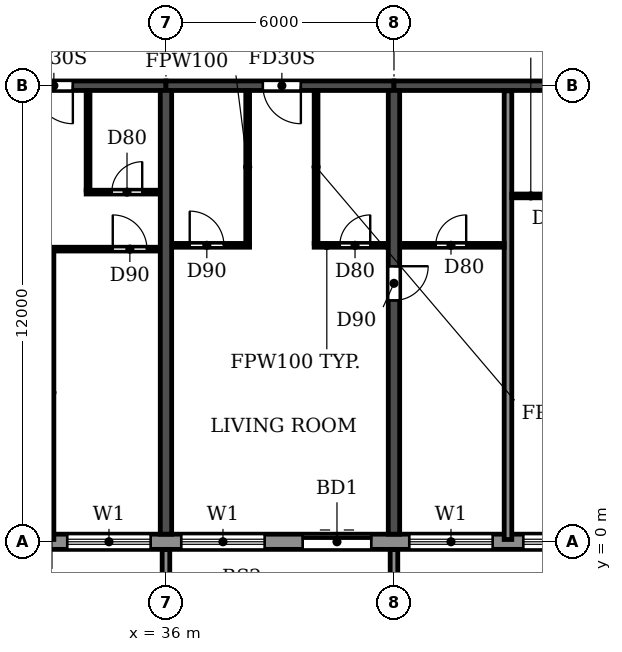
"""IFC4 building model, lengths in metres.
Left out: names, types, materials, properties, quantities, classifications, styles, units other than length and angle.
Written with IfcOpenShell. Run it as: python <this file> out.ifc"""

import sys

from ifc_helpers import new_model, si_unit, direction, frame, frame_2d, origin, place, context, subcontext, project, spatial, polyline, rectangle, outline, extrude, source, transform, mapped, element, fill, save


model = new_model("IFC4")
c1 = context("Model", 3, precision=1e-05, world=origin(), true_north=direction((0.0, 1.0)))
c2 = subcontext(c1, "Body", "Model", "MODEL_VIEW")
j1 = project(units=[si_unit("LENGTHUNIT", "METRE"), si_unit("PLANEANGLEUNIT", "RADIAN")], contexts=[c1])
p1 = place(None, origin())
s1 = spatial("IfcSite", under=j1, at=p1, CompositionType="ELEMENT")
p2 = place(p1, origin())
s2 = spatial("IfcBuilding", under=s1, at=p2, CompositionType="ELEMENT")
p3 = place(p2, frame((0.0, 0.0, 122.4)))
s3 = spatial("IfcBuildingStorey", under=s2, at=p3, CompositionType="ELEMENT", Elevation=122.4)
p4 = place(p3, frame((36.0, 0.2, 0.0), z_axis=(0.0, 0.0, 1.0), x_axis=(0.0, 1.0, 0.0)))
e1 = element("IfcWall", 1, at=p4, inside=s3, PredefinedType="SHEAR", context=c2, shape_type="SweptSolid", body=[
    extrude(rectangle(XDim=11.675, YDim=0.3, at=frame_2d((5.837, 0.0))), origin(), (0.0, 0.0, 1.0), 3.07),
])
p5 = place(p3, frame((42.0, 0.2, 0.0), z_axis=(0.0, 0.0, 1.0), x_axis=(0.0, 1.0, 0.0)))
e2 = element("IfcWall", 2, at=p5, inside=s3, PredefinedType="SHEAR", context=c2, shape_type="SweptSolid", body=[
    extrude(rectangle(XDim=11.675, YDim=0.3, at=frame_2d((5.837, 0.0))), origin(), (0.0, 0.0, 1.0), 3.07),
])
p6 = place(p5, frame((6.15, 0.0, 0.0)))
e3 = element("IfcOpeningElement", 3, at=p6, cuts=e2, PredefinedType="OPENING", context=c2, shape_type="SweptSolid", body=[
    extrude(rectangle(XDim=0.9, YDim=2.1, at=frame_2d((0.45, 1.05))), frame((0.0, 0.16, 0.0), z_axis=(0.0, -1.0, 0.0), x_axis=(1.0, 0.0, 0.0)), (0.0, 0.0, 1.0), 0.32),
])
p7 = place(p3, frame((30.0, 12.0, 0.0), z_axis=(0.0, 0.0, 1.0), x_axis=(1.0, 0.0, 0.0)))
e4 = element("IfcWall", 4, at=p7, inside=s3, PredefinedType="SHEAR", context=c2, shape_type="SweptSolid", body=[
    extrude(rectangle(XDim=6.0, YDim=0.25, at=frame_2d((3.0, 0.0))), origin(), (0.0, 0.0, 1.0), 2.47),
])
p8 = place(p7, frame((2.55, 0.0, 0.0)))
e5 = element("IfcOpeningElement", 5, at=p8, cuts=e4, PredefinedType="OPENING", context=c2, shape_type="SweptSolid", body=[
    extrude(rectangle(XDim=1.0, YDim=2.1, at=frame_2d((0.5, 1.05))), frame((0.0, 0.135, 0.0), z_axis=(0.0, -1.0, 0.0), x_axis=(1.0, 0.0, 0.0)), (0.0, 0.0, 1.0), 0.27),
])
p9 = place(p3, frame((36.0, 12.0, 0.0), z_axis=(0.0, 0.0, 1.0), x_axis=(1.0, 0.0, 0.0)))
e6 = element("IfcWall", 6, at=p9, inside=s3, PredefinedType="SHEAR", context=c2, shape_type="SweptSolid", body=[
    extrude(rectangle(XDim=6.0, YDim=0.25, at=frame_2d((3.0, 0.0))), origin(), (0.0, 0.0, 1.0), 2.47),
])
p10 = place(p9, frame((2.55, 0.0, 0.0)))
e7 = element("IfcOpeningElement", 7, at=p10, cuts=e6, PredefinedType="OPENING", context=c2, shape_type="SweptSolid", body=[
    extrude(rectangle(XDim=1.0, YDim=2.1, at=frame_2d((0.5, 1.05))), frame((0.0, 0.135, 0.0), z_axis=(0.0, -1.0, 0.0), x_axis=(1.0, 0.0, 0.0)), (0.0, 0.0, 1.0), 0.27),
])
p11 = place(p3, frame((42.0, 12.0, 0.0), z_axis=(0.0, 0.0, 1.0), x_axis=(1.0, 0.0, 0.0)))
e8 = element("IfcWall", 8, at=p11, inside=s3, PredefinedType="SHEAR", context=c2, shape_type="SweptSolid", body=[
    extrude(rectangle(XDim=6.0, YDim=0.25, at=frame_2d((3.0, 0.0))), origin(), (0.0, 0.0, 1.0), 2.47),
])
p12 = place(p3, frame((16.683, 0.0, 0.0), z_axis=(0.0, 0.0, 1.0), x_axis=(1.0, 0.0, 0.0)))
e9 = element("IfcWall", 9, at=p12, inside=s3, PredefinedType="STANDARD", context=c2, shape_type="SweptSolid", body=[
    extrude(rectangle(XDim=68.634, YDim=0.4, at=frame_2d((34.317, 0.0))), origin(), (0.0, 0.0, 1.0), 3.07),
])
p13 = place(p12, frame((1.717, 0.0, 0.9)))
e10 = element("IfcOpeningElement", 10, at=p13, cuts=e9, PredefinedType="OPENING", context=c2, shape_type="SweptSolid", body=[
    extrude(rectangle(XDim=2.2, YDim=1.5, at=frame_2d((1.1, 0.75))), frame((0.0, 0.21, 0.0), z_axis=(0.0, -1.0, 0.0), x_axis=(1.0, 0.0, 0.0)), (0.0, 0.0, 1.0), 0.42),
])
p14 = place(p12, frame((4.717, 0.0, 0.9)))
e11 = element("IfcOpeningElement", 11, at=p14, cuts=e9, PredefinedType="OPENING", context=c2, shape_type="SweptSolid", body=[
    extrude(rectangle(XDim=2.2, YDim=1.5, at=frame_2d((1.1, 0.75))), frame((0.0, 0.21, 0.0), z_axis=(0.0, -1.0, 0.0), x_axis=(1.0, 0.0, 0.0)), (0.0, 0.0, 1.0), 0.42),
])
p15 = place(p12, frame((7.717, 0.0, 0.9)))
e12 = element("IfcOpeningElement", 12, at=p15, cuts=e9, PredefinedType="OPENING", context=c2, shape_type="SweptSolid", body=[
    extrude(rectangle(XDim=2.2, YDim=1.5, at=frame_2d((1.1, 0.75))), frame((0.0, 0.21, 0.0), z_axis=(0.0, -1.0, 0.0), x_axis=(1.0, 0.0, 0.0)), (0.0, 0.0, 1.0), 0.42),
])
p16 = place(p12, frame((10.717, 0.0, 0.9)))
e13 = element("IfcOpeningElement", 13, at=p16, cuts=e9, PredefinedType="OPENING", context=c2, shape_type="SweptSolid", body=[
    extrude(rectangle(XDim=2.2, YDim=1.5, at=frame_2d((1.1, 0.75))), frame((0.0, 0.21, 0.0), z_axis=(0.0, -1.0, 0.0), x_axis=(1.0, 0.0, 0.0)), (0.0, 0.0, 1.0), 0.42),
])
p17 = place(p12, frame((13.717, 0.0, 0.9)))
e14 = element("IfcOpeningElement", 14, at=p17, cuts=e9, PredefinedType="OPENING", context=c2, shape_type="SweptSolid", body=[
    extrude(rectangle(XDim=2.2, YDim=1.5, at=frame_2d((1.1, 0.75))), frame((0.0, 0.21, 0.0), z_axis=(0.0, -1.0, 0.0), x_axis=(1.0, 0.0, 0.0)), (0.0, 0.0, 1.0), 0.42),
])
p18 = place(p12, frame((16.717, 0.0, 0.9)))
e15 = element("IfcOpeningElement", 15, at=p18, cuts=e9, PredefinedType="OPENING", context=c2, shape_type="SweptSolid", body=[
    extrude(rectangle(XDim=2.2, YDim=1.5, at=frame_2d((1.1, 0.75))), frame((0.0, 0.21, 0.0), z_axis=(0.0, -1.0, 0.0), x_axis=(1.0, 0.0, 0.0)), (0.0, 0.0, 1.0), 0.42),
])
p19 = place(p12, frame((19.717, 0.0, 0.9)))
e16 = element("IfcOpeningElement", 16, at=p19, cuts=e9, PredefinedType="OPENING", context=c2, shape_type="SweptSolid", body=[
    extrude(rectangle(XDim=2.2, YDim=1.5, at=frame_2d((1.1, 0.75))), frame((0.0, 0.21, 0.0), z_axis=(0.0, -1.0, 0.0), x_axis=(1.0, 0.0, 0.0)), (0.0, 0.0, 1.0), 0.42),
])
p20 = place(p12, frame((22.917, 0.0, 0.0)))
e17 = element("IfcOpeningElement", 17, at=p20, cuts=e9, PredefinedType="OPENING", context=c2, shape_type="SweptSolid", body=[
    extrude(rectangle(XDim=1.8, YDim=2.4, at=frame_2d((0.9, 1.2))), frame((0.0, 0.21, 0.0), z_axis=(0.0, -1.0, 0.0), x_axis=(1.0, 0.0, 0.0)), (0.0, 0.0, 1.0), 0.42),
])
p21 = place(p12, frame((25.717, 0.0, 0.9)))
e18 = element("IfcOpeningElement", 18, at=p21, cuts=e9, PredefinedType="OPENING", context=c2, shape_type="SweptSolid", body=[
    extrude(rectangle(XDim=2.2, YDim=1.5, at=frame_2d((1.1, 0.75))), frame((0.0, 0.21, 0.0), z_axis=(0.0, -1.0, 0.0), x_axis=(1.0, 0.0, 0.0)), (0.0, 0.0, 1.0), 0.42),
])
p22 = place(p12, frame((28.717, 0.0, 0.9)))
e19 = element("IfcOpeningElement", 19, at=p22, cuts=e9, PredefinedType="OPENING", context=c2, shape_type="SweptSolid", body=[
    extrude(rectangle(XDim=2.2, YDim=1.5, at=frame_2d((1.1, 0.75))), frame((0.0, 0.21, 0.0), z_axis=(0.0, -1.0, 0.0), x_axis=(1.0, 0.0, 0.0)), (0.0, 0.0, 1.0), 0.42),
])
p23 = place(p12, frame((31.717, 0.0, 0.9)))
e20 = element("IfcOpeningElement", 20, at=p23, cuts=e9, PredefinedType="OPENING", context=c2, shape_type="SweptSolid", body=[
    extrude(rectangle(XDim=2.2, YDim=1.5, at=frame_2d((1.1, 0.75))), frame((0.0, 0.21, 0.0), z_axis=(0.0, -1.0, 0.0), x_axis=(1.0, 0.0, 0.0)), (0.0, 0.0, 1.0), 0.42),
])
p24 = place(p12, frame((34.917, 0.0, 0.0)))
e21 = element("IfcOpeningElement", 21, at=p24, cuts=e9, PredefinedType="OPENING", context=c2, shape_type="SweptSolid", body=[
    extrude(rectangle(XDim=1.8, YDim=2.4, at=frame_2d((0.9, 1.2))), frame((0.0, 0.21, 0.0), z_axis=(0.0, -1.0, 0.0), x_axis=(1.0, 0.0, 0.0)), (0.0, 0.0, 1.0), 0.42),
])
p25 = place(p12, frame((37.717, 0.0, 0.9)))
e22 = element("IfcOpeningElement", 22, at=p25, cuts=e9, PredefinedType="OPENING", context=c2, shape_type="SweptSolid", body=[
    extrude(rectangle(XDim=2.2, YDim=1.5, at=frame_2d((1.1, 0.75))), frame((0.0, 0.21, 0.0), z_axis=(0.0, -1.0, 0.0), x_axis=(1.0, 0.0, 0.0)), (0.0, 0.0, 1.0), 0.42),
])
p26 = place(p12, frame((40.717, 0.0, 0.9)))
e23 = element("IfcOpeningElement", 23, at=p26, cuts=e9, PredefinedType="OPENING", context=c2, shape_type="SweptSolid", body=[
    extrude(rectangle(XDim=2.2, YDim=1.5, at=frame_2d((1.1, 0.75))), frame((0.0, 0.21, 0.0), z_axis=(0.0, -1.0, 0.0), x_axis=(1.0, 0.0, 0.0)), (0.0, 0.0, 1.0), 0.42),
])
p27 = place(p12, frame((43.717, 0.0, 0.9)))
e24 = element("IfcOpeningElement", 24, at=p27, cuts=e9, PredefinedType="OPENING", context=c2, shape_type="SweptSolid", body=[
    extrude(rectangle(XDim=2.2, YDim=1.5, at=frame_2d((1.1, 0.75))), frame((0.0, 0.21, 0.0), z_axis=(0.0, -1.0, 0.0), x_axis=(1.0, 0.0, 0.0)), (0.0, 0.0, 1.0), 0.42),
])
p28 = place(p12, frame((46.917, 0.0, 0.0)))
e25 = element("IfcOpeningElement", 25, at=p28, cuts=e9, PredefinedType="OPENING", context=c2, shape_type="SweptSolid", body=[
    extrude(rectangle(XDim=1.8, YDim=2.4, at=frame_2d((0.9, 1.2))), frame((0.0, 0.21, 0.0), z_axis=(0.0, -1.0, 0.0), x_axis=(1.0, 0.0, 0.0)), (0.0, 0.0, 1.0), 0.42),
])
p29 = place(p12, frame((49.717, 0.0, 0.9)))
e26 = element("IfcOpeningElement", 26, at=p29, cuts=e9, PredefinedType="OPENING", context=c2, shape_type="SweptSolid", body=[
    extrude(rectangle(XDim=2.2, YDim=1.5, at=frame_2d((1.1, 0.75))), frame((0.0, 0.21, 0.0), z_axis=(0.0, -1.0, 0.0), x_axis=(1.0, 0.0, 0.0)), (0.0, 0.0, 1.0), 0.42),
])
p30 = place(p12, frame((52.717, 0.0, 0.9)))
e27 = element("IfcOpeningElement", 27, at=p30, cuts=e9, PredefinedType="OPENING", context=c2, shape_type="SweptSolid", body=[
    extrude(rectangle(XDim=2.2, YDim=1.5, at=frame_2d((1.1, 0.75))), frame((0.0, 0.21, 0.0), z_axis=(0.0, -1.0, 0.0), x_axis=(1.0, 0.0, 0.0)), (0.0, 0.0, 1.0), 0.42),
])
p31 = place(p12, frame((55.717, 0.0, 0.9)))
e28 = element("IfcOpeningElement", 28, at=p31, cuts=e9, PredefinedType="OPENING", context=c2, shape_type="SweptSolid", body=[
    extrude(rectangle(XDim=2.2, YDim=1.5, at=frame_2d((1.1, 0.75))), frame((0.0, 0.21, 0.0), z_axis=(0.0, -1.0, 0.0), x_axis=(1.0, 0.0, 0.0)), (0.0, 0.0, 1.0), 0.42),
])
p32 = place(p12, frame((58.917, 0.0, 0.0)))
e29 = element("IfcOpeningElement", 29, at=p32, cuts=e9, PredefinedType="OPENING", context=c2, shape_type="SweptSolid", body=[
    extrude(rectangle(XDim=1.8, YDim=2.4, at=frame_2d((0.9, 1.2))), frame((0.0, 0.21, 0.0), z_axis=(0.0, -1.0, 0.0), x_axis=(1.0, 0.0, 0.0)), (0.0, 0.0, 1.0), 0.42),
])
p33 = place(p12, frame((61.717, 0.0, 0.9)))
e30 = element("IfcOpeningElement", 30, at=p33, cuts=e9, PredefinedType="OPENING", context=c2, shape_type="SweptSolid", body=[
    extrude(rectangle(XDim=2.2, YDim=1.5, at=frame_2d((1.1, 0.75))), frame((0.0, 0.21, 0.0), z_axis=(0.0, -1.0, 0.0), x_axis=(1.0, 0.0, 0.0)), (0.0, 0.0, 1.0), 0.42),
])
p34 = place(p12, frame((64.717, 0.0, 0.9)))
e31 = element("IfcOpeningElement", 31, at=p34, cuts=e9, PredefinedType="OPENING", context=c2, shape_type="SweptSolid", body=[
    extrude(rectangle(XDim=2.2, YDim=1.5, at=frame_2d((1.1, 0.75))), frame((0.0, 0.21, 0.0), z_axis=(0.0, -1.0, 0.0), x_axis=(1.0, 0.0, 0.0)), (0.0, 0.0, 1.0), 0.42),
])
m1 = source(origin(), c2, "Body", "SweptSolid", [
    extrude(outline(polyline([(0.0, 0.0), (0.2, 0.0), (0.2, 1.65), (0.0, 1.65), (0.0, 0.0)])), origin(), (0.0, 0.0, 1.0), 3.1),
])
for number, where in (
    (32, (35.9, -1.85, 0.0)),
    (33, (41.9, -1.85, 0.0)),
):
    element("IfcWall", number, at=place(p3, frame(where)), inside=s3, PredefinedType="STANDARD", context=c2, shape_type="MappedRepresentation", body=[
        mapped(m1, transform((0.0, 0.0, 0.0))),
    ])
p35 = place(p3, frame((45.0, 0.06, 0.0), z_axis=(0.0, 0.0, 1.0), x_axis=(0.0, 1.0, 0.0)))
e34 = element("IfcWall", 34, at=p35, inside=s3, PredefinedType="PARTITIONING", context=c2, shape_type="SweptSolid", body=[
    extrude(rectangle(XDim=11.805, YDim=0.2, at=frame_2d((5.902, 0.0))), origin(), (0.0, 0.0, 1.0), 3.07),
])
p36 = place(p3, frame((32.95, 7.7, 0.0), z_axis=(0.0, 0.0, 1.0), x_axis=(1.0, 0.0, 0.0)))
e35 = element("IfcWall", 35, at=p36, inside=s3, PredefinedType="PARTITIONING", context=c2, shape_type="SweptSolid", body=[
    extrude(rectangle(XDim=2.89, YDim=0.1, at=frame_2d((1.445, 0.0))), origin(), (0.0, 0.0, 1.0), 3.07),
])
p37 = place(p36, frame((1.65, 0.0, 0.0)))
e36 = element("IfcOpeningElement", 36, at=p37, cuts=e35, PredefinedType="OPENING", context=c2, shape_type="SweptSolid", body=[
    extrude(rectangle(XDim=0.9, YDim=2.1, at=frame_2d((0.45, 1.05))), frame((0.0, 0.06, 0.0), z_axis=(0.0, -1.0, 0.0), x_axis=(1.0, 0.0, 0.0)), (0.0, 0.0, 1.0), 0.12),
])
p38 = place(p3, frame((36.16, 7.8, 0.0), z_axis=(0.0, 0.0, 1.0), x_axis=(1.0, 0.0, 0.0)))
e37 = element("IfcWall", 37, at=p38, inside=s3, PredefinedType="PARTITIONING", context=c2, shape_type="SweptSolid", body=[
    extrude(rectangle(XDim=2.04, YDim=0.1, at=frame_2d((1.02, 0.0))), origin(), (0.0, 0.0, 1.0), 3.07),
])
p39 = place(p38, frame((0.465, 0.0, 0.0)))
e38 = element("IfcOpeningElement", 38, at=p39, cuts=e37, PredefinedType="OPENING", context=c2, shape_type="SweptSolid", body=[
    extrude(rectangle(XDim=0.9, YDim=2.1, at=frame_2d((0.45, 1.05))), frame((0.0, 0.06, 0.0), z_axis=(0.0, -1.0, 0.0), x_axis=(1.0, 0.0, 0.0)), (0.0, 0.0, 1.0), 0.12),
])
p40 = place(p3, frame((39.9, 7.8, 0.0), z_axis=(0.0, 0.0, 1.0), x_axis=(1.0, 0.0, 0.0)))
e39 = element("IfcWall", 39, at=p40, inside=s3, PredefinedType="PARTITIONING", context=c2, shape_type="SweptSolid", body=[
    extrude(rectangle(XDim=1.94, YDim=0.1, at=frame_2d((0.97, 0.0))), origin(), (0.0, 0.0, 1.0), 3.07),
])
p41 = place(p40, frame((0.675, 0.0, 0.0)))
e40 = element("IfcOpeningElement", 40, at=p41, cuts=e39, PredefinedType="OPENING", context=c2, shape_type="SweptSolid", body=[
    extrude(rectangle(XDim=0.8, YDim=2.1, at=frame_2d((0.4, 1.05))), frame((0.0, 0.06, 0.0), z_axis=(0.0, -1.0, 0.0), x_axis=(1.0, 0.0, 0.0)), (0.0, 0.0, 1.0), 0.12),
])
p42 = place(p3, frame((42.16, 7.8, 0.0), z_axis=(0.0, 0.0, 1.0), x_axis=(1.0, 0.0, 0.0)))
e41 = element("IfcWall", 41, at=p42, inside=s3, PredefinedType="PARTITIONING", context=c2, shape_type="SweptSolid", body=[
    extrude(rectangle(XDim=2.74, YDim=0.1, at=frame_2d((1.37, 0.0))), origin(), (0.0, 0.0, 1.0), 3.07),
])
p43 = place(p42, frame((0.94, 0.0, 0.0)))
e42 = element("IfcOpeningElement", 42, at=p43, cuts=e41, PredefinedType="OPENING", context=c2, shape_type="SweptSolid", body=[
    extrude(rectangle(XDim=0.8, YDim=2.1, at=frame_2d((0.4, 1.05))), frame((0.0, 0.06, 0.0), z_axis=(0.0, -1.0, 0.0), x_axis=(1.0, 0.0, 0.0)), (0.0, 0.0, 1.0), 0.12),
])
p44 = place(p3, frame((45.1, 9.1, 0.0), z_axis=(0.0, 0.0, 1.0), x_axis=(1.0, 0.0, 0.0)))
e43 = element("IfcWall", 43, at=p44, inside=s3, PredefinedType="PARTITIONING", context=c2, shape_type="SweptSolid", body=[
    extrude(rectangle(XDim=2.74, YDim=0.1, at=frame_2d((1.37, 0.0))), origin(), (0.0, 0.0, 1.0), 3.07),
])
p45 = place(p44, frame((1.0, 0.0, 0.0)))
e44 = element("IfcOpeningElement", 44, at=p45, cuts=e43, PredefinedType="OPENING", context=c2, shape_type="SweptSolid", body=[
    extrude(rectangle(XDim=0.8, YDim=2.1, at=frame_2d((0.4, 1.05))), frame((0.0, 0.06, 0.0), z_axis=(0.0, -1.0, 0.0), x_axis=(1.0, 0.0, 0.0)), (0.0, 0.0, 1.0), 0.12),
])
p46 = place(p3, frame((33.9, 9.2, 0.0), z_axis=(0.0, 0.0, 1.0), x_axis=(1.0, 0.0, 0.0)))
e45 = element("IfcWall", 45, at=p46, inside=s3, PredefinedType="PARTITIONING", context=c2, shape_type="SweptSolid", body=[
    extrude(rectangle(XDim=1.94, YDim=0.1, at=frame_2d((0.97, 0.0))), origin(), (0.0, 0.0, 1.0), 3.07),
])
p47 = place(p46, frame((0.675, 0.0, 0.0)))
e46 = element("IfcOpeningElement", 46, at=p47, cuts=e45, PredefinedType="OPENING", context=c2, shape_type="SweptSolid", body=[
    extrude(rectangle(XDim=0.8, YDim=2.1, at=frame_2d((0.4, 1.05))), frame((0.0, 0.06, 0.0), z_axis=(0.0, -1.0, 0.0), x_axis=(1.0, 0.0, 0.0)), (0.0, 0.0, 1.0), 0.12),
])
p48 = place(p3, frame((33.0, 0.06, 0.0), z_axis=(0.0, 0.0, 1.0), x_axis=(0.0, 1.0, 0.0)))
e47 = element("IfcWall", 47, at=p48, inside=s3, PredefinedType="PARTITIONING", context=c2, shape_type="SweptSolid", body=[
    extrude(rectangle(XDim=7.59, YDim=0.1, at=frame_2d((3.795, 0.0))), origin(), (0.0, 0.0, 1.0), 3.07),
])
p49 = place(p3, frame((33.95, 9.25, 0.0), z_axis=(0.0, 0.0, 1.0), x_axis=(0.0, 1.0, 0.0)))
e48 = element("IfcWall", 48, at=p49, inside=s3, PredefinedType="PARTITIONING", context=c2, shape_type="SweptSolid", body=[
    extrude(rectangle(XDim=2.615, YDim=0.1, at=frame_2d((1.308, 0.0))), origin(), (0.0, 0.0, 1.0), 3.07),
])
for number, where, z_axis, x_axis in (
    (49, (38.15, 7.85, 0.0), (0.0, 0.0, 1.0), (0.0, 1.0, 0.0)),
    (50, (39.95, 7.85, 0.0), (0.0, 0.0, 1.0), (0.0, 1.0, 0.0)),
):
    element("IfcWall", number, at=place(p3, frame(where, z_axis=z_axis, x_axis=x_axis)), inside=s3, PredefinedType="PARTITIONING", context=c2, shape_type="SweptSolid", body=[
        extrude(rectangle(XDim=4.015, YDim=0.1, at=frame_2d((2.007, 0.0))), origin(), (0.0, 0.0, 1.0), 3.07),
    ])
p50 = place(p18, origin())
e51 = element("IfcWindow", 51, at=p50, inside=s3, PartitioningType="DOUBLE_PANEL_HORIZONTAL", PredefinedType="WINDOW", context=c2, shape_type="SweptSolid", body=[
    extrude(rectangle(XDim=2.2, YDim=1.5, at=frame_2d((1.1, 0.75))), frame((0.0, 0.03, 0.0), z_axis=(0.0, -1.0, 0.0), x_axis=(1.0, 0.0, 0.0)), (0.0, 0.0, 1.0), 0.06),
])
fill(e15, e51)
p51 = place(p19, origin())
e52 = element("IfcWindow", 52, at=p51, inside=s3, PartitioningType="DOUBLE_PANEL_HORIZONTAL", PredefinedType="WINDOW", context=c2, shape_type="SweptSolid", body=[
    extrude(rectangle(XDim=2.2, YDim=1.5, at=frame_2d((1.1, 0.75))), frame((0.0, 0.03, 0.0), z_axis=(0.0, -1.0, 0.0), x_axis=(1.0, 0.0, 0.0)), (0.0, 0.0, 1.0), 0.06),
])
fill(e16, e52)
p52 = place(p20, origin())
e53 = element("IfcDoor", 53, at=p52, inside=s3, OperationType="DOUBLE_DOOR_SLIDING", PredefinedType="DOOR", context=c2, shape_type="SweptSolid", body=[
    extrude(rectangle(XDim=1.8, YDim=2.4, at=frame_2d((0.9, 1.2))), frame((0.0, 0.025, 0.0), z_axis=(0.0, -1.0, 0.0), x_axis=(1.0, 0.0, 0.0)), (0.0, 0.0, 1.0), 0.05),
])
fill(e17, e53)
p53 = place(p21, origin())
e54 = element("IfcWindow", 54, at=p53, inside=s3, PartitioningType="DOUBLE_PANEL_HORIZONTAL", PredefinedType="WINDOW", context=c2, shape_type="SweptSolid", body=[
    extrude(rectangle(XDim=2.2, YDim=1.5, at=frame_2d((1.1, 0.75))), frame((0.0, 0.03, 0.0), z_axis=(0.0, -1.0, 0.0), x_axis=(1.0, 0.0, 0.0)), (0.0, 0.0, 1.0), 0.06),
])
fill(e18, e54)
p54 = place(p22, origin())
e55 = element("IfcWindow", 55, at=p54, inside=s3, PartitioningType="DOUBLE_PANEL_HORIZONTAL", PredefinedType="WINDOW", context=c2, shape_type="SweptSolid", body=[
    extrude(rectangle(XDim=2.2, YDim=1.5, at=frame_2d((1.1, 0.75))), frame((0.0, 0.03, 0.0), z_axis=(0.0, -1.0, 0.0), x_axis=(1.0, 0.0, 0.0)), (0.0, 0.0, 1.0), 0.06),
])
fill(e19, e55)
p55 = place(p8, frame((1.0, 0.0, 0.0), z_axis=(0.0, 0.0, 1.0), x_axis=(-1.0, 0.0, 0.0)))
e56 = element("IfcDoor", 56, at=p55, inside=s3, OperationType="SINGLE_SWING_LEFT", PredefinedType="DOOR", context=c2, shape_type="SweptSolid", body=[
    extrude(rectangle(XDim=1.0, YDim=2.1, at=frame_2d((0.5, 1.05))), frame((0.0, 0.025, 0.0), z_axis=(0.0, -1.0, 0.0), x_axis=(1.0, 0.0, 0.0)), (0.0, 0.0, 1.0), 0.05),
])
fill(e5, e56)
p56 = place(p47, origin())
e57 = element("IfcDoor", 57, at=p56, inside=s3, OperationType="SINGLE_SWING_RIGHT", PredefinedType="DOOR", context=c2, shape_type="SweptSolid", body=[
    extrude(rectangle(XDim=0.8, YDim=2.1, at=frame_2d((0.4, 1.05))), frame((0.0, 0.025, 0.0), z_axis=(0.0, -1.0, 0.0), x_axis=(1.0, 0.0, 0.0)), (0.0, 0.0, 1.0), 0.05),
])
fill(e46, e57)
p57 = place(p37, origin())
e58 = element("IfcDoor", 58, at=p57, inside=s3, OperationType="SINGLE_SWING_LEFT", PredefinedType="DOOR", context=c2, shape_type="SweptSolid", body=[
    extrude(rectangle(XDim=0.9, YDim=2.1, at=frame_2d((0.45, 1.05))), frame((0.0, 0.025, 0.0), z_axis=(0.0, -1.0, 0.0), x_axis=(1.0, 0.0, 0.0)), (0.0, 0.0, 1.0), 0.05),
])
fill(e36, e58)
p58 = place(p43, origin())
e59 = element("IfcDoor", 59, at=p58, inside=s3, OperationType="SINGLE_SWING_RIGHT", PredefinedType="DOOR", context=c2, shape_type="SweptSolid", body=[
    extrude(rectangle(XDim=0.8, YDim=2.1, at=frame_2d((0.4, 1.05))), frame((0.0, 0.025, 0.0), z_axis=(0.0, -1.0, 0.0), x_axis=(1.0, 0.0, 0.0)), (0.0, 0.0, 1.0), 0.05),
])
fill(e42, e59)
p59 = place(p39, origin())
e60 = element("IfcDoor", 60, at=p59, inside=s3, OperationType="SINGLE_SWING_LEFT", PredefinedType="DOOR", context=c2, shape_type="SweptSolid", body=[
    extrude(rectangle(XDim=0.9, YDim=2.1, at=frame_2d((0.45, 1.05))), frame((0.0, 0.025, 0.0), z_axis=(0.0, -1.0, 0.0), x_axis=(1.0, 0.0, 0.0)), (0.0, 0.0, 1.0), 0.05),
])
fill(e38, e60)
p60 = place(p10, frame((1.0, 0.0, 0.0), z_axis=(0.0, 0.0, 1.0), x_axis=(-1.0, 0.0, 0.0)))
e61 = element("IfcDoor", 61, at=p60, inside=s3, OperationType="SINGLE_SWING_LEFT", PredefinedType="DOOR", context=c2, shape_type="SweptSolid", body=[
    extrude(rectangle(XDim=1.0, YDim=2.1, at=frame_2d((0.5, 1.05))), frame((0.0, 0.025, 0.0), z_axis=(0.0, -1.0, 0.0), x_axis=(1.0, 0.0, 0.0)), (0.0, 0.0, 1.0), 0.05),
])
fill(e7, e61)
p61 = place(p41, origin())
e62 = element("IfcDoor", 62, at=p61, inside=s3, OperationType="SINGLE_SWING_RIGHT", PredefinedType="DOOR", context=c2, shape_type="SweptSolid", body=[
    extrude(rectangle(XDim=0.8, YDim=2.1, at=frame_2d((0.4, 1.05))), frame((0.0, 0.025, 0.0), z_axis=(0.0, -1.0, 0.0), x_axis=(1.0, 0.0, 0.0)), (0.0, 0.0, 1.0), 0.05),
])
fill(e40, e62)
p62 = place(p6, frame((0.9, 0.0, 0.0), z_axis=(0.0, 0.0, 1.0), x_axis=(-1.0, 0.0, 0.0)))
e63 = element("IfcDoor", 63, at=p62, inside=s3, OperationType="SINGLE_SWING_LEFT", PredefinedType="DOOR", context=c2, shape_type="SweptSolid", body=[
    extrude(rectangle(XDim=0.9, YDim=2.1, at=frame_2d((0.45, 1.05))), frame((0.0, 0.025, 0.0), z_axis=(0.0, -1.0, 0.0), x_axis=(1.0, 0.0, 0.0)), (0.0, 0.0, 1.0), 0.05),
])
fill(e3, e63)
save(model, sys.argv[1])
